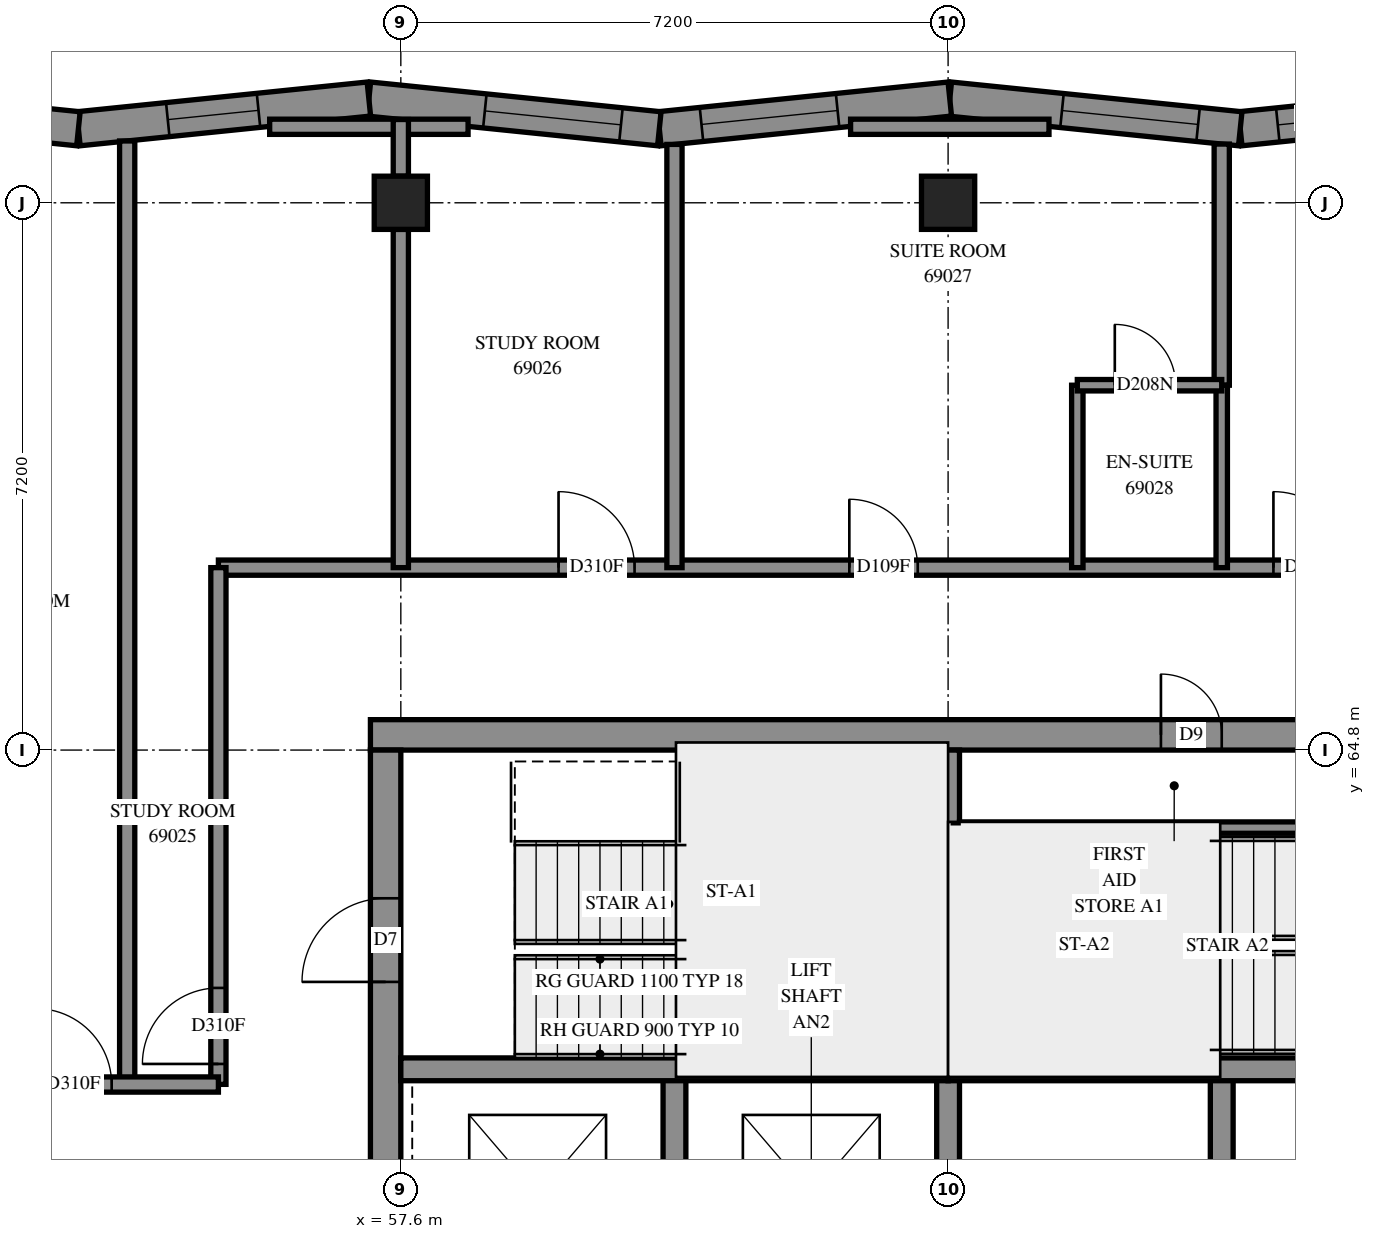
"""IFC4 building model, lengths in metres.
Left out: names, types, materials, properties, quantities, classifications, styles, units other than length and angle.
Written with IfcOpenShell. Run it as: python <this file> out.ifc"""

import sys

from ifc_helpers import new_model, si_unit, direction, frame, frame_2d, origin, origin_2d, place, context, subcontext, project, spatial, polyline, rectangle, outline, extrude, element, fill, save


model = new_model("IFC4")
c1 = context("Model", 3, precision=1e-05, world=origin(), true_north=direction((0.0, 1.0)))
c2 = subcontext(c1, "Body", "Model", "MODEL_VIEW")
j1 = project(units=[si_unit("LENGTHUNIT", "METRE"), si_unit("PLANEANGLEUNIT", "RADIAN")], contexts=[c1])
p1 = place(None, origin())
s1 = spatial("IfcSite", under=j1, at=p1, CompositionType="ELEMENT")
p2 = place(p1, origin())
s2 = spatial("IfcBuilding", under=s1, at=p2, CompositionType="ELEMENT")
p3 = place(p2, frame((0.0, 0.0, 254.0)))
s3 = spatial("IfcBuildingStorey", under=s2, at=p3, CompositionType="ELEMENT", Elevation=254.0)
for number, where, z_axis, x_axis in (
    (1, (57.6, 72.0, 0.0), (0.0, 0.0, 1.0), (1.0, 0.0, 0.0)),
    (2, (64.8, 72.0, 0.0), (0.0, 0.0, 1.0), (1.0, 0.0, 0.0)),
):
    element("IfcColumn", number, at=place(p3, frame(where, z_axis=z_axis, x_axis=x_axis)), inside=s3, PredefinedType="COLUMN", context=c2, shape_type="SweptSolid", body=[
        extrude(rectangle(XDim=0.7, YDim=0.7, at=origin_2d()), origin(), (0.0, 0.0, 1.0), 3.1),
    ])
p4 = place(p3, frame((57.2, 65.0, -0.3), z_axis=(0.0, 0.0, 1.0), x_axis=(1.0, 0.0, 0.0)))
e3 = element("IfcWall", 3, at=p4, inside=s3, PredefinedType="SHEAR", context=c2, shape_type="SweptSolid", body=[
    extrude(rectangle(XDim=15.2, YDim=0.4, at=frame_2d((7.6, 0.0))), origin(), (0.0, 0.0, 1.0), 2.7),
])
p5 = place(p4, frame((10.4, 0.0, 0.3)))
e4 = element("IfcOpeningElement", 4, at=p5, cuts=e3, PredefinedType="OPENING", context=c2, shape_type="SweptSolid", body=[
    extrude(rectangle(XDim=0.8, YDim=2.1, at=frame_2d((0.4, 1.05))), frame((0.0, 0.21, 0.0), z_axis=(0.0, -1.0, 0.0), x_axis=(1.0, 0.0, 0.0)), (0.0, 0.0, 1.0), 0.42),
])
p6 = place(p3, frame((57.4, 50.4, -0.3), z_axis=(0.0, 0.0, 1.0), x_axis=(0.0, 1.0, 0.0)))
e5 = element("IfcWall", 5, at=p6, inside=s3, PredefinedType="SHEAR", context=c2, shape_type="SweptSolid", body=[
    extrude(rectangle(XDim=14.4, YDim=0.4, at=frame_2d((7.2, 0.0))), origin(), (0.0, 0.0, 1.0), 2.7),
])
p7 = place(p6, frame((4.55, 0.0, 0.3)))
e6 = element("IfcOpeningElement", 6, at=p7, cuts=e5, PredefinedType="OPENING", context=c2, shape_type="SweptSolid", body=[
    extrude(rectangle(XDim=1.1, YDim=2.1, at=frame_2d((0.55, 1.05))), frame((0.0, 0.21, 0.0), z_axis=(0.0, -1.0, 0.0), x_axis=(1.0, 0.0, 0.0)), (0.0, 0.0, 1.0), 0.42),
])
p8 = place(p6, frame((11.35, 0.0, 0.3)))
e7 = element("IfcOpeningElement", 7, at=p8, cuts=e5, PredefinedType="OPENING", context=c2, shape_type="SweptSolid", body=[
    extrude(rectangle(XDim=1.1, YDim=2.1, at=frame_2d((0.55, 1.05))), frame((0.0, 0.21, 0.0), z_axis=(0.0, -1.0, 0.0), x_axis=(1.0, 0.0, 0.0)), (0.0, 0.0, 1.0), 0.42),
])
for number, where, z_axis, x_axis in (
    (8, (61.2, 57.3, 0.0), (0.0, 0.0, 1.0), (0.0, 1.0, 0.0)),
    (9, (64.8, 57.3, 0.0), (0.0, 0.0, 1.0), (0.0, 1.0, 0.0)),
    (10, (68.4, 57.3, 0.0), (0.0, 0.0, 1.0), (0.0, 1.0, 0.0)),
):
    element("IfcWall", number, at=place(p3, frame(where, z_axis=z_axis, x_axis=x_axis)), inside=s3, PredefinedType="SOLIDWALL", context=c2, shape_type="SweptSolid", body=[
        extrude(rectangle(XDim=3.3, YDim=0.3, at=frame_2d((1.65, 0.0))), origin(), (0.0, 0.0, 1.0), 3.1),
    ])
for number, where, z_axis, x_axis in (
    (11, (57.6, 60.6, 0.0), (0.0, 0.0, 1.0), (1.0, 0.0, 0.0)),
    (12, (64.8, 60.6, 0.0), (0.0, 0.0, 1.0), (1.0, 0.0, 0.0)),
):
    element("IfcWall", number, at=place(p3, frame(where, z_axis=z_axis, x_axis=x_axis)), inside=s3, PredefinedType="SOLIDWALL", context=c2, shape_type="SweptSolid", body=[
        extrude(rectangle(XDim=7.2, YDim=0.3, at=frame_2d((3.6, 0.0))), origin(), (0.0, 0.0, 1.0), 3.1),
    ])
p9 = place(p3, frame((64.8, 60.6, 0.0), z_axis=(0.0, 0.0, 1.0), x_axis=(0.0, 1.0, 0.0)))
e13 = element("IfcWall", 13, at=p9, inside=s3, PredefinedType="SOLIDWALL", context=c2, shape_type="SweptSolid", body=[
    extrude(rectangle(XDim=4.2, YDim=0.3, at=frame_2d((2.1, 0.0))), origin(), (0.0, 0.0, 1.0), 3.1),
])
p10 = place(p3, frame((72.465, 73.365, 0.0), z_axis=(0.0, 0.0, 1.0), x_axis=(-0.9948059356, -0.1017897367, 0.0)))
e14 = element("IfcWall", 14, at=p10, inside=s3, PredefinedType="SOLIDWALL", context=c2, shape_type="SweptSolid", body=[
    extrude(outline(polyline([(-0.023, -0.225), (3.818, -0.225), (3.864, 0.225), (0.023, 0.225), (-0.023, -0.225)])), origin(), (0.0, 0.0, 1.0), 3.1),
])
p11 = place(p10, frame((1.545, 0.0, 0.7)))
e15 = element("IfcOpeningElement", 15, at=p11, cuts=e14, PredefinedType="OPENING", context=c2, shape_type="SweptSolid", body=[
    extrude(rectangle(XDim=1.8, YDim=2.3, at=frame_2d((0.9, 1.15))), frame((0.0, 0.235, 0.0), z_axis=(0.0, -1.0, 0.0), x_axis=(1.0, 0.0, 0.0)), (0.0, 0.0, 1.0), 0.47),
])
p12 = place(p3, frame((68.644, 72.974, 0.0), z_axis=(0.0, 0.0, 1.0), x_axis=(-0.9948059356, 0.1017897367, 0.0)))
e16 = element("IfcWall", 16, at=p12, inside=s3, PredefinedType="SOLIDWALL", context=c2, shape_type="SweptSolid", body=[
    extrude(outline(polyline([(0.023, -0.225), (3.864, -0.225), (3.818, 0.225), (-0.023, 0.225), (0.023, -0.225)])), origin(), (0.0, 0.0, 1.0), 3.1),
])
p13 = place(p12, frame((0.557, 0.0, 0.7)))
e17 = element("IfcOpeningElement", 17, at=p13, cuts=e16, PredefinedType="OPENING", context=c2, shape_type="SweptSolid", body=[
    extrude(rectangle(XDim=1.8, YDim=2.3, at=frame_2d((0.9, 1.15))), frame((0.0, 0.235, 0.0), z_axis=(0.0, -1.0, 0.0), x_axis=(1.0, 0.0, 0.0)), (0.0, 0.0, 1.0), 0.47),
])
p14 = place(p3, frame((64.822, 73.365, 0.0), z_axis=(0.0, 0.0, 1.0), x_axis=(-0.9948062053, -0.1017871006, 0.0)))
e18 = element("IfcWall", 18, at=p14, inside=s3, PredefinedType="SOLIDWALL", context=c2, shape_type="SweptSolid", body=[
    extrude(outline(polyline([(-0.023, -0.225), (3.818, -0.225), (3.864, 0.225), (0.023, 0.225), (-0.023, -0.225)])), origin(), (0.0, 0.0, 1.0), 3.1),
])
p15 = place(p14, frame((1.484, 0.0, 0.7)))
e19 = element("IfcOpeningElement", 19, at=p15, cuts=e18, PredefinedType="OPENING", context=c2, shape_type="SweptSolid", body=[
    extrude(rectangle(XDim=1.8, YDim=2.3, at=frame_2d((0.9, 1.15))), frame((0.0, 0.235, 0.0), z_axis=(0.0, -1.0, 0.0), x_axis=(1.0, 0.0, 0.0)), (0.0, 0.0, 1.0), 0.47),
])
p16 = place(p3, frame((61.001, 72.974, 0.0), z_axis=(0.0, 0.0, 1.0), x_axis=(-0.9948059356, 0.1017897367, 0.0)))
e20 = element("IfcWall", 20, at=p16, inside=s3, PredefinedType="SOLIDWALL", context=c2, shape_type="SweptSolid", body=[
    extrude(outline(polyline([(0.023, -0.225), (3.864, -0.225), (3.818, 0.225), (-0.023, 0.225), (0.023, -0.225)])), origin(), (0.0, 0.0, 1.0), 3.1),
])
p17 = place(p16, frame((0.508, 0.0, 0.7)))
e21 = element("IfcOpeningElement", 21, at=p17, cuts=e20, PredefinedType="OPENING", context=c2, shape_type="SweptSolid", body=[
    extrude(rectangle(XDim=1.8, YDim=2.3, at=frame_2d((0.9, 1.15))), frame((0.0, 0.235, 0.0), z_axis=(0.0, -1.0, 0.0), x_axis=(1.0, 0.0, 0.0)), (0.0, 0.0, 1.0), 0.47),
])
p18 = place(p3, frame((57.18, 73.365, 0.0), z_axis=(0.0, 0.0, 1.0), x_axis=(-0.9948059356, -0.1017897367, 0.0)))
e22 = element("IfcWall", 22, at=p18, inside=s3, PredefinedType="SOLIDWALL", context=c2, shape_type="SweptSolid", body=[
    extrude(outline(polyline([(-0.023, -0.225), (3.818, -0.225), (3.864, 0.225), (0.023, 0.225), (-0.023, -0.225)])), origin(), (0.0, 0.0, 1.0), 3.1),
])
p19 = place(p18, frame((1.46, 0.0, 0.45)))
e23 = element("IfcOpeningElement", 23, at=p19, cuts=e22, PredefinedType="OPENING", context=c2, shape_type="SweptSolid", body=[
    extrude(rectangle(XDim=1.2, YDim=2.55, at=frame_2d((0.6, 1.275))), frame((0.0, 0.235, 0.0), z_axis=(0.0, -1.0, 0.0), x_axis=(1.0, 0.0, 0.0)), (0.0, 0.0, 1.0), 0.47),
])
p20 = place(p3, frame((53.358, 72.974, 0.0), z_axis=(0.0, 0.0, 1.0), x_axis=(-0.9948059356, 0.1017897367, 0.0)))
e24 = element("IfcWall", 24, at=p20, inside=s3, PredefinedType="SOLIDWALL", context=c2, shape_type="SweptSolid", body=[
    extrude(outline(polyline([(0.023, -0.225), (3.864, -0.225), (3.818, 0.225), (-0.023, 0.225), (0.023, -0.225)])), origin(), (0.0, 0.0, 1.0), 3.1),
])
p21 = place(p20, frame((0.987, 0.0, 0.45)))
e25 = element("IfcOpeningElement", 25, at=p21, cuts=e24, PredefinedType="OPENING", context=c2, shape_type="SweptSolid", body=[
    extrude(rectangle(XDim=1.2, YDim=2.55, at=frame_2d((0.6, 1.275))), frame((0.0, 0.235, 0.0), z_axis=(0.0, -1.0, 0.0), x_axis=(1.0, 0.0, 0.0)), (0.0, 0.0, 1.0), 0.47),
])
p22 = place(p3, frame((64.95, 63.78, 0.0), z_axis=(0.0, 0.0, 1.0), x_axis=(1.0, 0.0, 0.0)))
e26 = element("IfcWall", 26, at=p22, inside=s3, PredefinedType="PARTITIONING", context=c2, shape_type="SweptSolid", body=[
    extrude(rectangle(XDim=5.65, YDim=0.15, at=frame_2d((2.825, 0.0))), origin(), (0.0, 0.0, 1.0), 3.1),
])
p23 = place(p3, frame((55.2, 67.2, 0.0), z_axis=(0.0, 0.0, 1.0), x_axis=(1.0, 0.0, 0.0)))
e27 = element("IfcWall", 27, at=p23, inside=s3, PredefinedType="PARTITIONING", context=c2, shape_type="SweptSolid", body=[
    extrude(rectangle(XDim=19.2, YDim=0.2, at=frame_2d((9.6, 0.0))), origin(), (0.0, 0.0, 1.0), 3.1),
])
p24 = place(p23, frame((4.475, 0.0, 0.0)))
e28 = element("IfcOpeningElement", 28, at=p24, cuts=e27, PredefinedType="OPENING", context=c2, shape_type="SweptSolid", body=[
    extrude(rectangle(XDim=1.0, YDim=2.1, at=frame_2d((0.5, 1.05))), frame((0.0, 0.11, 0.0), z_axis=(0.0, -1.0, 0.0), x_axis=(1.0, 0.0, 0.0)), (0.0, 0.0, 1.0), 0.22),
])
p25 = place(p23, frame((8.301, 0.0, 0.0)))
e29 = element("IfcOpeningElement", 29, at=p25, cuts=e27, PredefinedType="OPENING", context=c2, shape_type="SweptSolid", body=[
    extrude(rectangle(XDim=0.9, YDim=2.1, at=frame_2d((0.45, 1.05))), frame((0.0, 0.11, 0.0), z_axis=(0.0, -1.0, 0.0), x_axis=(1.0, 0.0, 0.0)), (0.0, 0.0, 1.0), 0.22),
])
p26 = place(p23, frame((13.88, 0.0, 0.0)))
e30 = element("IfcOpeningElement", 30, at=p26, cuts=e27, PredefinedType="OPENING", context=c2, shape_type="SweptSolid", body=[
    extrude(rectangle(XDim=1.0, YDim=2.1, at=frame_2d((0.5, 1.05))), frame((0.0, 0.11, 0.0), z_axis=(0.0, -1.0, 0.0), x_axis=(1.0, 0.0, 0.0)), (0.0, 0.0, 1.0), 0.22),
])
p27 = place(p3, frame((54.0, 60.4, 0.0), z_axis=(0.0, 0.0, 1.0), x_axis=(0.0, 1.0, 0.0)))
e31 = element("IfcWall", 31, at=p27, inside=s3, PredefinedType="PARTITIONING", context=c2, shape_type="SweptSolid", body=[
    extrude(rectangle(XDim=12.413, YDim=0.2, at=frame_2d((6.207, 0.0))), origin(), (0.0, 0.0, 1.0), 3.1),
])
p28 = place(p3, frame((55.2, 60.402, 0.0), z_axis=(0.0, 0.0, 1.0), x_axis=(0.0, 1.0, 0.0)))
e32 = element("IfcWall", 32, at=p28, inside=s3, PredefinedType="PARTITIONING", context=c2, shape_type="SweptSolid", body=[
    extrude(rectangle(XDim=6.798, YDim=0.2, at=frame_2d((3.399, 0.0))), origin(), (0.0, 0.0, 1.0), 3.1),
])
p29 = place(p28, frame((0.269, 0.0, 0.0)))
e33 = element("IfcOpeningElement", 33, at=p29, cuts=e32, PredefinedType="OPENING", context=c2, shape_type="SweptSolid", body=[
    extrude(rectangle(XDim=1.0, YDim=2.1, at=frame_2d((0.5, 1.05))), frame((0.0, 0.11, 0.0), z_axis=(0.0, -1.0, 0.0), x_axis=(1.0, 0.0, 0.0)), (0.0, 0.0, 1.0), 0.22),
])
p30 = place(p3, frame((61.2, 67.2, 0.0), z_axis=(0.0, 0.0, 1.0), x_axis=(0.0, 1.0, 0.0)))
e34 = element("IfcWall", 34, at=p30, inside=s3, PredefinedType="PARTITIONING", context=c2, shape_type="SweptSolid", body=[
    extrude(rectangle(XDim=5.568, YDim=0.2, at=frame_2d((2.784, 0.0))), origin(), (0.0, 0.0, 1.0), 3.1),
])
p31 = place(p3, frame((57.6, 67.2, 0.0), z_axis=(0.0, 0.0, 1.0), x_axis=(0.0, 1.0, 0.0)))
e35 = element("IfcWall", 35, at=p31, inside=s3, PredefinedType="PARTITIONING", context=c2, shape_type="SweptSolid", body=[
    extrude(rectangle(XDim=4.45, YDim=0.2, at=frame_2d((2.225, 0.0))), origin(), (0.0, 0.0, 1.0), 3.1),
])
p32 = place(p3, frame((50.85, 60.4, 0.0), z_axis=(0.0, 0.0, 1.0), x_axis=(1.0, 0.0, 0.0)))
e36 = element("IfcWall", 36, at=p32, inside=s3, PredefinedType="PARTITIONING", context=c2, shape_type="SweptSolid", body=[
    extrude(rectangle(XDim=4.35, YDim=0.2, at=frame_2d((2.175, 0.0))), origin(), (0.0, 0.0, 1.0), 3.1),
])
p33 = place(p32, frame((1.946, 0.0, 0.0)))
e37 = element("IfcOpeningElement", 37, at=p33, cuts=e36, PredefinedType="OPENING", context=c2, shape_type="SweptSolid", body=[
    extrude(rectangle(XDim=1.0, YDim=2.1, at=frame_2d((0.5, 1.05))), frame((0.0, 0.11, 0.0), z_axis=(0.0, -1.0, 0.0), x_axis=(1.0, 0.0, 0.0)), (0.0, 0.0, 1.0), 0.22),
])
p34 = place(p3, frame((68.4, 69.6, 0.0), z_axis=(0.0, 0.0, 1.0), x_axis=(0.0, 1.0, 0.0)))
e38 = element("IfcWall", 38, at=p34, inside=s3, PredefinedType="PARTITIONING", context=c2, shape_type="SweptSolid", body=[
    extrude(rectangle(XDim=3.173, YDim=0.2, at=frame_2d((1.586, 0.0))), origin(), (0.0, 0.0, 1.0), 3.1),
])
for number, where, z_axis, x_axis in (
    (39, (55.875, 73.0, 0.0), (0.0, 0.0, 1.0), (1.0, 0.0, 0.0)),
    (40, (63.517, 73.0, 0.0), (0.0, 0.0, 1.0), (1.0, 0.0, 0.0)),
):
    element("IfcWall", number, at=place(p3, frame(where, z_axis=z_axis, x_axis=x_axis)), inside=s3, PredefinedType="PARTITIONING", context=c2, shape_type="SweptSolid", body=[
        extrude(rectangle(XDim=2.61, YDim=0.2, at=frame_2d((1.305, 0.0))), origin(), (0.0, 0.0, 1.0), 3.1),
    ])
for number, where, z_axis, x_axis in (
    (41, (66.5, 67.2, 0.0), (0.0, 0.0, 1.0), (0.0, 1.0, 0.0)),
    (42, (68.4, 67.2, 0.0), (0.0, 0.0, 1.0), (0.0, 1.0, 0.0)),
):
    element("IfcWall", number, at=place(p3, frame(where, z_axis=z_axis, x_axis=x_axis)), inside=s3, PredefinedType="PARTITIONING", context=c2, shape_type="SweptSolid", body=[
        extrude(rectangle(XDim=2.4, YDim=0.15, at=frame_2d((1.2, 0.0))), origin(), (0.0, 0.0, 1.0), 3.1),
    ])
p35 = place(p3, frame((66.5, 69.6, 0.0), z_axis=(0.0, 0.0, 1.0), x_axis=(1.0, 0.0, 0.0)))
e43 = element("IfcWall", 43, at=p35, inside=s3, PredefinedType="PARTITIONING", context=c2, shape_type="SweptSolid", body=[
    extrude(rectangle(XDim=1.9, YDim=0.15, at=frame_2d((0.95, 0.0))), origin(), (0.0, 0.0, 1.0), 3.1),
])
p36 = place(p35, frame((0.493, 0.0, 0.0)))
e44 = element("IfcOpeningElement", 44, at=p36, cuts=e43, PredefinedType="OPENING", context=c2, shape_type="SweptSolid", body=[
    extrude(rectangle(XDim=0.8, YDim=2.1, at=frame_2d((0.4, 1.05))), frame((0.0, 0.085, 0.0), z_axis=(0.0, -1.0, 0.0), x_axis=(1.0, 0.0, 0.0)), (0.0, 0.0, 1.0), 0.17),
])
p37 = place(p3, frame((57.6, 72.35, 0.0), z_axis=(0.0, 0.0, 1.0), x_axis=(0.0, 1.0, 0.0)))
e45 = element("IfcWall", 45, at=p37, inside=s3, PredefinedType="PARTITIONING", context=c2, shape_type="SweptSolid", body=[
    extrude(rectangle(XDim=0.746, YDim=0.2, at=frame_2d((0.373, 0.0))), origin(), (0.0, 0.0, 1.0), 3.1),
])
p38 = place(p19, origin())
e46 = element("IfcWindow", 46, at=p38, inside=s3, PartitioningType="SINGLE_PANEL", PredefinedType="WINDOW", context=c2, shape_type="SweptSolid", body=[
    extrude(rectangle(XDim=1.2, YDim=2.55, at=frame_2d((0.6, 1.275))), frame((0.0, 0.205, 0.0), z_axis=(0.0, -1.0, 0.0), x_axis=(1.0, 0.0, 0.0)), (0.0, 0.0, 1.0), 0.06),
])
fill(e23, e46)
p39 = place(p5, origin())
e47 = element("IfcDoor", 47, at=p39, inside=s3, OperationType="SINGLE_SWING_RIGHT", PredefinedType="DOOR", context=c2, shape_type="SweptSolid", body=[
    extrude(rectangle(XDim=0.8, YDim=2.1, at=frame_2d((0.4, 1.05))), frame((0.0, 0.025, 0.0), z_axis=(0.0, -1.0, 0.0), x_axis=(1.0, 0.0, 0.0)), (0.0, 0.0, 1.0), 0.05),
])
fill(e4, e47)
p40 = place(p8, origin())
e48 = element("IfcDoor", 48, at=p40, inside=s3, OperationType="SINGLE_SWING_LEFT", PredefinedType="DOOR", context=c2, shape_type="SweptSolid", body=[
    extrude(rectangle(XDim=1.1, YDim=2.1, at=frame_2d((0.55, 1.05))), frame((0.0, 0.025, 0.0), z_axis=(0.0, -1.0, 0.0), x_axis=(1.0, 0.0, 0.0)), (0.0, 0.0, 1.0), 0.05),
])
fill(e7, e48)
p41 = place(p33, origin())
e49 = element("IfcDoor", 49, at=p41, inside=s3, OperationType="SINGLE_SWING_RIGHT", PredefinedType="DOOR", context=c2, shape_type="SweptSolid", body=[
    extrude(rectangle(XDim=1.0, YDim=2.1, at=frame_2d((0.5, 1.05))), frame((0.0, 0.025, 0.0), z_axis=(0.0, -1.0, 0.0), x_axis=(1.0, 0.0, 0.0)), (0.0, 0.0, 1.0), 0.05),
])
fill(e37, e49)
p42 = place(p29, origin())
e50 = element("IfcDoor", 50, at=p42, inside=s3, OperationType="SINGLE_SWING_LEFT", PredefinedType="DOOR", context=c2, shape_type="SweptSolid", body=[
    extrude(rectangle(XDim=1.0, YDim=2.1, at=frame_2d((0.5, 1.05))), frame((0.0, 0.025, 0.0), z_axis=(0.0, -1.0, 0.0), x_axis=(1.0, 0.0, 0.0)), (0.0, 0.0, 1.0), 0.05),
])
fill(e33, e50)
p43 = place(p24, origin())
e51 = element("IfcDoor", 51, at=p43, inside=s3, OperationType="SINGLE_SWING_RIGHT", PredefinedType="DOOR", context=c2, shape_type="SweptSolid", body=[
    extrude(rectangle(XDim=1.0, YDim=2.1, at=frame_2d((0.5, 1.05))), frame((0.0, 0.025, 0.0), z_axis=(0.0, -1.0, 0.0), x_axis=(1.0, 0.0, 0.0)), (0.0, 0.0, 1.0), 0.05),
])
fill(e28, e51)
p44 = place(p25, origin())
e52 = element("IfcDoor", 52, at=p44, inside=s3, OperationType="SINGLE_SWING_LEFT", PredefinedType="DOOR", context=c2, shape_type="SweptSolid", body=[
    extrude(rectangle(XDim=0.9, YDim=2.1, at=frame_2d((0.45, 1.05))), frame((0.0, 0.025, 0.0), z_axis=(0.0, -1.0, 0.0), x_axis=(1.0, 0.0, 0.0)), (0.0, 0.0, 1.0), 0.05),
])
fill(e29, e52)
p45 = place(p36, origin())
e53 = element("IfcDoor", 53, at=p45, inside=s3, OperationType="SINGLE_SWING_RIGHT", PredefinedType="DOOR", context=c2, shape_type="SweptSolid", body=[
    extrude(rectangle(XDim=0.8, YDim=2.1, at=frame_2d((0.4, 1.05))), frame((0.0, 0.025, 0.0), z_axis=(0.0, -1.0, 0.0), x_axis=(1.0, 0.0, 0.0)), (0.0, 0.0, 1.0), 0.05),
])
fill(e44, e53)
p46 = place(p26, origin())
e54 = element("IfcDoor", 54, at=p46, inside=s3, OperationType="SINGLE_SWING_LEFT", PredefinedType="DOOR", context=c2, shape_type="SweptSolid", body=[
    extrude(rectangle(XDim=1.0, YDim=2.1, at=frame_2d((0.5, 1.05))), frame((0.0, 0.025, 0.0), z_axis=(0.0, -1.0, 0.0), x_axis=(1.0, 0.0, 0.0)), (0.0, 0.0, 1.0), 0.05),
])
fill(e30, e54)
p47 = place(p11, origin())
e55 = element("IfcWindow", 55, at=p47, inside=s3, PartitioningType="SINGLE_PANEL", PredefinedType="WINDOW", context=c2, shape_type="SweptSolid", body=[
    extrude(rectangle(XDim=1.8, YDim=2.3, at=frame_2d((0.9, 1.15))), frame((0.0, 0.205, 0.0), z_axis=(0.0, -1.0, 0.0), x_axis=(1.0, 0.0, 0.0)), (0.0, 0.0, 1.0), 0.06),
])
fill(e15, e55)
p48 = place(p13, origin())
e56 = element("IfcWindow", 56, at=p48, inside=s3, PartitioningType="SINGLE_PANEL", PredefinedType="WINDOW", context=c2, shape_type="SweptSolid", body=[
    extrude(rectangle(XDim=1.8, YDim=2.3, at=frame_2d((0.9, 1.15))), frame((0.0, 0.205, 0.0), z_axis=(0.0, -1.0, 0.0), x_axis=(1.0, 0.0, 0.0)), (0.0, 0.0, 1.0), 0.06),
])
fill(e17, e56)
p49 = place(p15, origin())
e57 = element("IfcWindow", 57, at=p49, inside=s3, PartitioningType="SINGLE_PANEL", PredefinedType="WINDOW", context=c2, shape_type="SweptSolid", body=[
    extrude(rectangle(XDim=1.8, YDim=2.3, at=frame_2d((0.9, 1.15))), frame((0.0, 0.205, 0.0), z_axis=(0.0, -1.0, 0.0), x_axis=(1.0, 0.0, 0.0)), (0.0, 0.0, 1.0), 0.06),
])
fill(e19, e57)
p50 = place(p17, origin())
e58 = element("IfcWindow", 58, at=p50, inside=s3, PartitioningType="SINGLE_PANEL", PredefinedType="WINDOW", context=c2, shape_type="SweptSolid", body=[
    extrude(rectangle(XDim=1.8, YDim=2.3, at=frame_2d((0.9, 1.15))), frame((0.0, 0.205, 0.0), z_axis=(0.0, -1.0, 0.0), x_axis=(1.0, 0.0, 0.0)), (0.0, 0.0, 1.0), 0.06),
])
fill(e21, e58)
save(model, sys.argv[1])
